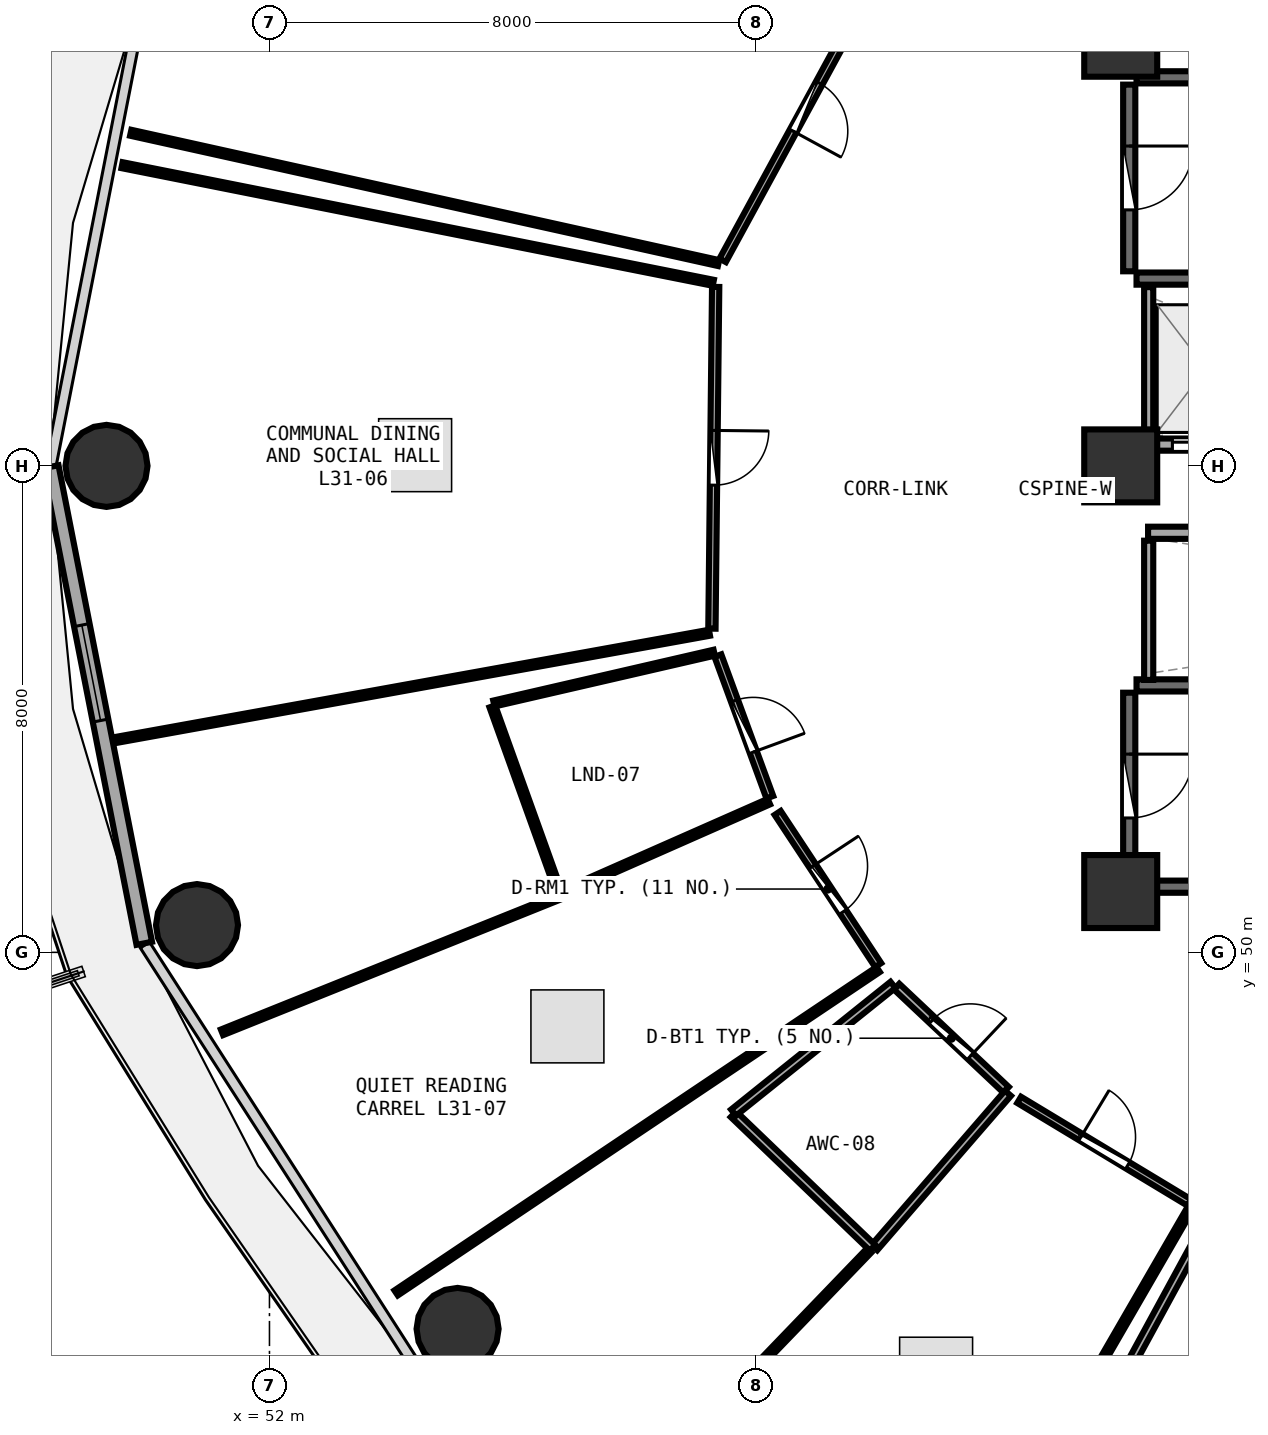
"""IFC4 building model, lengths in metres.
Left out: names, types, materials, properties, quantities, classifications, styles, units other than length and angle.
Written with IfcOpenShell. Run it as: python <this file> out.ifc"""

import sys

from ifc_helpers import new_model, si_unit, direction, frame, frame_2d, origin, origin_2d, place, context, subcontext, project, spatial, rectangle, circle, extrude, element, fill, save


model = new_model("IFC4")
c1 = context("Model", 3, precision=1e-05, world=origin(), true_north=direction((0.0, 1.0)))
c2 = subcontext(c1, "Body", "Model", "MODEL_VIEW")
j1 = project(units=[si_unit("LENGTHUNIT", "METRE"), si_unit("PLANEANGLEUNIT", "RADIAN")], contexts=[c1])
p1 = place(None, origin())
s1 = spatial("IfcSite", under=j1, at=p1, CompositionType="ELEMENT")
p2 = place(p1, origin())
s2 = spatial("IfcBuilding", under=s1, at=p2, CompositionType="ELEMENT")
p3 = place(p2, frame((0.0, 0.0, 121.35)))
s3 = spatial("IfcBuildingStorey", under=s2, at=p3, CompositionType="ELEMENT", Elevation=121.35)
for number, where, z_axis, x_axis in (
    (1, (66.0, 51.0, 0.0), (0.0, 0.0, 1.0), (1.0, 0.0, 0.0)),
    (2, (66.0, 65.0, 0.0), (0.0, 0.0, 1.0), (1.0, 0.0, 0.0)),
    (3, (66.0, 58.0, 0.0), (0.0, 0.0, 1.0), (1.0, 0.0, 0.0)),
):
    element("IfcColumn", number, at=place(p3, frame(where, z_axis=z_axis, x_axis=x_axis)), inside=s3, PredefinedType="PILASTER", context=c2, shape_type="SweptSolid", body=[
        extrude(rectangle(XDim=1.2, YDim=1.2, at=origin_2d()), origin(), (0.0, 0.0, 1.0), 3.75),
    ])
for number, where, z_axis, x_axis in (
    (4, (49.32, 58.0, 0.0), (0.0, 0.0, 1.0), (1.0, 0.0, 0.0)),
    (5, (50.808, 50.448, 0.0), (0.0, 0.0, 1.0), (1.0, 0.0, 0.0)),
    (6, (55.094, 43.807, 0.0), (0.0, 0.0, 1.0), (1.0, 0.0, 0.0)),
):
    element("IfcColumn", number, at=place(p3, frame(where, z_axis=z_axis, x_axis=x_axis)), inside=s3, PredefinedType="COLUMN", context=c2, shape_type="SweptSolid", body=[
        extrude(circle(Radius=0.675, at=origin_2d()), origin(), (0.0, 0.0, 1.0), 3.75),
    ])
p4 = place(p3, frame((48.403, 57.985, 0.0), z_axis=(0.0, 0.0, 1.0), x_axis=(0.192581843632, -0.981280914674, 0.0)))
e7 = element("IfcWall", 7, at=p4, inside=s3, PredefinedType="SOLIDWALL", context=c2, shape_type="SweptSolid", body=[
    extrude(rectangle(XDim=7.987, YDim=0.26, at=frame_2d((3.993, 0.0))), origin(), (0.0, 0.0, 1.0), 3.475),
])
p5 = place(p4, frame((2.653, 0.0, 0.85)))
e8 = element("IfcOpeningElement", 8, at=p5, cuts=e7, PredefinedType="OPENING", context=c2, shape_type="SweptSolid", body=[
    extrude(rectangle(XDim=1.6, YDim=1.45, at=frame_2d((0.8, 0.725))), frame((0.0, 0.14, 0.0), z_axis=(0.0, -1.0, 0.0), x_axis=(1.0, 0.0, 0.0)), (0.0, 0.0, 1.0), 0.28),
])
for number, where, z_axis, x_axis in (
    (9, (66.26, 61.08, 0.0), (0.0, 0.0, 1.0), (1.0, 0.0, 0.0)),
    (10, (73.42, 64.39, 0.0), (0.0, 0.0, 1.0), (-1.0, 0.0, 0.0)),
):
    element("IfcWall", number, at=place(p3, frame(where, z_axis=z_axis, x_axis=x_axis)), inside=s3, PredefinedType="SHEAR", context=c2, shape_type="SweptSolid", body=[
        extrude(rectangle(XDim=7.16, YDim=0.2, at=frame_2d((3.58, 0.0))), origin(), (0.0, 0.0, 1.0), 3.49),
    ])
p6 = place(p3, frame((66.14, 64.27, 0.0), z_axis=(0.0, 0.0, 1.0), x_axis=(0.0, -1.0, 0.0)))
e11 = element("IfcWall", 11, at=p6, inside=s3, PredefinedType="SHEAR", context=c2, shape_type="SweptSolid", body=[
    extrude(rectangle(XDim=3.07, YDim=0.2, at=frame_2d((1.535, 0.0))), origin(), (0.0, 0.0, 1.0), 3.49),
])
p7 = place(p6, frame((1.01, 0.0, 0.0)))
e12 = element("IfcOpeningElement", 12, at=p7, cuts=e11, PredefinedType="OPENING", context=c2, shape_type="SweptSolid", body=[
    extrude(rectangle(XDim=1.05, YDim=2.1, at=frame_2d((0.525, 1.05))), frame((0.0, 0.11, 0.0), z_axis=(0.0, -1.0, 0.0), x_axis=(1.0, 0.0, 0.0)), (0.0, 0.0, 1.0), 0.22),
])
for number, where, z_axis, x_axis in (
    (13, (66.26, 51.08, 0.0), (0.0, 0.0, 1.0), (1.0, 0.0, 0.0)),
    (14, (73.42, 54.39, 0.0), (0.0, 0.0, 1.0), (-1.0, 0.0, 0.0)),
):
    element("IfcWall", number, at=place(p3, frame(where, z_axis=z_axis, x_axis=x_axis)), inside=s3, PredefinedType="SHEAR", context=c2, shape_type="SweptSolid", body=[
        extrude(rectangle(XDim=7.16, YDim=0.2, at=frame_2d((3.58, 0.0))), origin(), (0.0, 0.0, 1.0), 3.49),
    ])
p8 = place(p3, frame((66.14, 54.27, 0.0), z_axis=(0.0, 0.0, 1.0), x_axis=(0.0, -1.0, 0.0)))
e15 = element("IfcWall", 15, at=p8, inside=s3, PredefinedType="SHEAR", context=c2, shape_type="SweptSolid", body=[
    extrude(rectangle(XDim=3.07, YDim=0.2, at=frame_2d((1.535, 0.0))), origin(), (0.0, 0.0, 1.0), 3.49),
])
p9 = place(p8, frame((1.01, 0.0, 0.0)))
e16 = element("IfcOpeningElement", 16, at=p9, cuts=e15, PredefinedType="OPENING", context=c2, shape_type="SweptSolid", body=[
    extrude(rectangle(XDim=1.05, YDim=2.1, at=frame_2d((0.525, 1.05))), frame((0.0, 0.11, 0.0), z_axis=(0.0, -1.0, 0.0), x_axis=(1.0, 0.0, 0.0)), (0.0, 0.0, 1.0), 0.22),
])
p10 = place(p3, frame((66.45, 58.35, 0.0), z_axis=(0.0, 0.0, 1.0), x_axis=(1.0, 0.0, 0.0)))
e17 = element("IfcWall", 17, at=p10, inside=s3, PredefinedType="SOLIDWALL", context=c2, shape_type="SweptSolid", body=[
    extrude(rectangle(XDim=6.0, YDim=0.2, at=frame_2d((3.0, 0.0))), origin(), (0.0, 0.0, 1.0), 3.48),
])
p11 = place(p10, frame((0.4, 0.0, 0.0)))
e18 = element("IfcOpeningElement", 18, at=p11, cuts=e17, PredefinedType="OPENING", context=c2, shape_type="SweptSolid", body=[
    extrude(rectangle(XDim=1.1, YDim=2.1, at=frame_2d((0.55, 1.05))), frame((0.0, 0.11, 0.0), z_axis=(0.0, -1.0, 0.0), x_axis=(1.0, 0.0, 0.0)), (0.0, 0.0, 1.0), 0.22),
])
p12 = place(p10, frame((2.4, 0.0, 0.0)))
e19 = element("IfcOpeningElement", 19, at=p12, cuts=e17, PredefinedType="OPENING", context=c2, shape_type="SweptSolid", body=[
    extrude(rectangle(XDim=1.1, YDim=2.1, at=frame_2d((0.55, 1.05))), frame((0.0, 0.11, 0.0), z_axis=(0.0, -1.0, 0.0), x_axis=(1.0, 0.0, 0.0)), (0.0, 0.0, 1.0), 0.22),
])
p13 = place(p10, frame((4.4, 0.0, 0.0)))
e20 = element("IfcOpeningElement", 20, at=p13, cuts=e17, PredefinedType="OPENING", context=c2, shape_type="SweptSolid", body=[
    extrude(rectangle(XDim=1.1, YDim=2.1, at=frame_2d((0.55, 1.05))), frame((0.0, 0.11, 0.0), z_axis=(0.0, -1.0, 0.0), x_axis=(1.0, 0.0, 0.0)), (0.0, 0.0, 1.0), 0.22),
])
p14 = place(p3, frame((66.46, 58.48, 0.0), z_axis=(0.0, 0.0, 1.0), x_axis=(0.0, 1.0, 0.0)))
e21 = element("IfcWall", 21, at=p14, inside=s3, PredefinedType="PARTITIONING", context=c2, shape_type="SweptSolid", body=[
    extrude(rectangle(XDim=2.46, YDim=0.15, at=frame_2d((1.23, 0.0))), origin(), (0.0, 0.0, 1.0), 3.48),
])
p15 = place(p3, frame((66.45, 56.9, 0.0), z_axis=(0.0, 0.0, 1.0), x_axis=(1.0, 0.0, 0.0)))
e22 = element("IfcWall", 22, at=p15, inside=s3, PredefinedType="SOLIDWALL", context=c2, shape_type="SweptSolid", body=[
    extrude(rectangle(XDim=14.4, YDim=0.2, at=frame_2d((7.2, 0.0))), origin(), (0.0, 0.0, 1.0), 3.48),
])
p16 = place(p3, frame((66.46, 54.48, 0.0), z_axis=(0.0, 0.0, 1.0), x_axis=(0.0, 1.0, 0.0)))
e23 = element("IfcWall", 23, at=p16, inside=s3, PredefinedType="PARTITIONING", context=c2, shape_type="SweptSolid", body=[
    extrude(rectangle(XDim=2.29, YDim=0.15, at=frame_2d((1.145, 0.0))), origin(), (0.0, 0.0, 1.0), 3.48),
])
p17 = place(p3, frame((62.199, 66.421, 0.0), z_axis=(0.0, 0.0, 1.0), x_axis=(-0.478256103777, -0.878220416069, 0.0)))
e24 = element("IfcWall", 24, at=p17, inside=s3, PredefinedType="PARTITIONING", context=c2, shape_type="SweptSolid", body=[
    extrude(rectangle(XDim=5.741, YDim=0.12, at=frame_2d((2.871, 0.0))), origin(), (0.0, 0.0, 1.0), 2.925),
])
p18 = place(p17, frame((2.42, 0.0, 0.0)))
e25 = element("IfcOpeningElement", 25, at=p18, cuts=e24, PredefinedType="OPENING", context=c2, shape_type="SweptSolid", body=[
    extrude(rectangle(XDim=0.9, YDim=2.08, at=frame_2d((0.45, 1.04))), frame((0.0, 0.07, 0.0), z_axis=(0.0, -1.0, 0.0), x_axis=(1.0, 0.0, 0.0)), (0.0, 0.0, 1.0), 0.14),
])
p19 = place(p3, frame((59.338, 60.943, 0.0), z_axis=(0.0, 0.0, 1.0), x_axis=(-0.010989779386, -0.999939610551, 0.0)))
e26 = element("IfcWall", 26, at=p19, inside=s3, PredefinedType="PARTITIONING", context=c2, shape_type="SweptSolid", body=[
    extrude(rectangle(XDim=5.62, YDim=0.12, at=frame_2d((2.81, 0.0))), origin(), (0.0, 0.0, 1.0), 2.925),
])
p20 = place(p19, frame((2.36, 0.0, 0.0)))
e27 = element("IfcOpeningElement", 27, at=p20, cuts=e26, PredefinedType="OPENING", context=c2, shape_type="SweptSolid", body=[
    extrude(rectangle(XDim=0.9, YDim=2.08, at=frame_2d((0.45, 1.04))), frame((0.0, 0.07, 0.0), z_axis=(0.0, -1.0, 0.0), x_axis=(1.0, 0.0, 0.0)), (0.0, 0.0, 1.0), 0.14),
])
p21 = place(p3, frame((59.375, 54.881, 0.0), z_axis=(0.0, 0.0, 1.0), x_axis=(0.344396316594, -0.938824359035, 0.0)))
e28 = element("IfcWall", 28, at=p21, inside=s3, PredefinedType="PARTITIONING", context=c2, shape_type="SweptSolid", body=[
    extrude(rectangle(XDim=2.481, YDim=0.12, at=frame_2d((1.241, 0.0))), origin(), (0.0, 0.0, 1.0), 3.235),
])
p22 = place(p21, frame((0.791, 0.0, 0.0)))
e29 = element("IfcOpeningElement", 29, at=p22, cuts=e28, PredefinedType="OPENING", context=c2, shape_type="SweptSolid", body=[
    extrude(rectangle(XDim=0.9, YDim=2.08, at=frame_2d((0.45, 1.04))), frame((0.0, 0.07, 0.0), z_axis=(0.0, -1.0, 0.0), x_axis=(1.0, 0.0, 0.0)), (0.0, 0.0, 1.0), 0.14),
])
p23 = place(p3, frame((60.358, 52.293, 0.0), z_axis=(0.0, 0.0, 1.0), x_axis=(0.551050840628, -0.834471671804, 0.0)))
e30 = element("IfcWall", 30, at=p23, inside=s3, PredefinedType="PARTITIONING", context=c2, shape_type="SweptSolid", body=[
    extrude(rectangle(XDim=3.0, YDim=0.12, at=frame_2d((1.5, 0.0))), origin(), (0.0, 0.0, 1.0), 2.925),
])
p24 = place(p23, frame((1.05, 0.0, 0.0)))
e31 = element("IfcOpeningElement", 31, at=p24, cuts=e30, PredefinedType="OPENING", context=c2, shape_type="SweptSolid", body=[
    extrude(rectangle(XDim=0.9, YDim=2.08, at=frame_2d((0.45, 1.04))), frame((0.0, 0.07, 0.0), z_axis=(0.0, -1.0, 0.0), x_axis=(1.0, 0.0, 0.0)), (0.0, 0.0, 1.0), 0.14),
])
p25 = place(p3, frame((62.314, 49.437, 0.0), z_axis=(0.0, 0.0, 1.0), x_axis=(0.727704720547, -0.68589054498, 0.0)))
e32 = element("IfcWall", 32, at=p25, inside=s3, PredefinedType="PLUMBINGWALL", context=c2, shape_type="SweptSolid", body=[
    extrude(rectangle(XDim=2.476, YDim=0.13, at=frame_2d((1.238, 0.0))), origin(), (0.0, 0.0, 1.0), 2.925),
])
p26 = place(p25, frame((0.808, 0.0, 0.0)))
e33 = element("IfcOpeningElement", 33, at=p26, cuts=e32, PredefinedType="OPENING", context=c2, shape_type="SweptSolid", body=[
    extrude(rectangle(XDim=0.86, YDim=2.05, at=frame_2d((0.43, 1.025))), frame((0.0, 0.075, 0.0), z_axis=(0.0, -1.0, 0.0), x_axis=(1.0, 0.0, 0.0)), (0.0, 0.0, 1.0), 0.15),
])
p27 = place(p3, frame((64.329, 47.574, 0.0), z_axis=(0.0, 0.0, 1.0), x_axis=(0.8562252486, -0.516602674848, 0.0)))
e34 = element("IfcWall", 34, at=p27, inside=s3, PredefinedType="PARTITIONING", context=c2, shape_type="SweptSolid", body=[
    extrude(rectangle(XDim=3.269, YDim=0.12, at=frame_2d((1.635, 0.0))), origin(), (0.0, 0.0, 1.0), 2.925),
])
p28 = place(p27, frame((1.185, 0.0, 0.0)))
e35 = element("IfcOpeningElement", 35, at=p28, cuts=e34, PredefinedType="OPENING", context=c2, shape_type="SweptSolid", body=[
    extrude(rectangle(XDim=0.9, YDim=2.08, at=frame_2d((0.45, 1.04))), frame((0.0, 0.07, 0.0), z_axis=(0.0, -1.0, 0.0), x_axis=(1.0, 0.0, 0.0)), (0.0, 0.0, 1.0), 0.14),
])
p29 = place(p3, frame((59.386, 61.336, 0.0), z_axis=(0.0, 0.0, 1.0), x_axis=(-0.976312199438, 0.216366562178, 0.0)))
e36 = element("IfcWall", 36, at=p29, inside=s3, PredefinedType="PARTITIONING", context=c2, shape_type="SweptSolid", body=[
    extrude(rectangle(XDim=9.903, YDim=0.1, at=frame_2d((4.951, 0.0))), origin(), (0.0, 0.0, 1.0), 2.975),
])
p30 = place(p3, frame((59.237, 55.256, 0.0), z_axis=(0.0, 0.0, 1.0), x_axis=(-0.984081766615, -0.177716281237, 0.0)))
e37 = element("IfcWall", 37, at=p30, inside=s3, PredefinedType="PARTITIONING", context=c2, shape_type="SweptSolid", body=[
    extrude(rectangle(XDim=9.924, YDim=0.1, at=frame_2d((4.962, 0.0))), origin(), (0.0, 0.0, 1.0), 2.975),
])
p31 = place(p3, frame((49.575, 62.945, 0.0), z_axis=(0.0, 0.0, 1.0), x_axis=(0.980780933509, -0.195112174059, 0.0)))
e38 = element("IfcWall", 38, at=p31, inside=s3, PredefinedType="PARTITIONING", context=c2, shape_type="SweptSolid", body=[
    extrude(rectangle(XDim=9.915, YDim=0.1, at=frame_2d((4.958, 0.0))), origin(), (0.0, 0.0, 1.0), 2.975),
])
p32 = place(p3, frame((60.213, 52.479, 0.0), z_axis=(0.0, 0.0, 1.0), x_axis=(-0.914847920866, -0.403798565732, 0.0)))
e39 = element("IfcWall", 39, at=p32, inside=s3, PredefinedType="PARTITIONING", context=c2, shape_type="SweptSolid", body=[
    extrude(rectangle(XDim=3.719, YDim=0.1, at=frame_2d((1.86, 0.0))), origin(), (0.0, 0.0, 1.0), 3.175),
])
p33 = place(p3, frame((56.76, 50.999, 0.0), z_axis=(0.0, 0.0, 1.0), x_axis=(-0.338198726163, 0.94107471628, 0.0)))
e40 = element("IfcWall", 40, at=p33, inside=s3, PredefinedType="PARTITIONING", context=c2, shape_type="SweptSolid", body=[
    extrude(rectangle(XDim=3.238, YDim=0.1, at=frame_2d((1.619, 0.0))), origin(), (0.0, 0.0, 1.0), 3.175),
])
p34 = place(p3, frame((55.691, 54.092, 0.0), z_axis=(0.0, 0.0, 1.0), x_axis=(0.974413318027, 0.224763621728, 0.0)))
e41 = element("IfcWall", 41, at=p34, inside=s3, PredefinedType="PARTITIONING", context=c2, shape_type="SweptSolid", body=[
    extrude(rectangle(XDim=3.719, YDim=0.1, at=frame_2d((1.86, 0.0))), origin(), (0.0, 0.0, 1.0), 3.175),
])
p35 = place(p3, frame((62.011, 49.718, 0.0), z_axis=(0.0, 0.0, 1.0), x_axis=(-0.830433607217, -0.557117603388, 0.0)))
e42 = element("IfcWall", 42, at=p35, inside=s3, PredefinedType="PARTITIONING", context=c2, shape_type="SweptSolid", body=[
    extrude(rectangle(XDim=9.546, YDim=0.1, at=frame_2d((4.773, 0.0))), origin(), (0.0, 0.0, 1.0), 2.975),
])
p36 = place(p3, frame((51.219, 48.685, 0.0), z_axis=(0.0, 0.0, 1.0), x_axis=(0.927926926295, 0.372762148637, 0.0)))
e43 = element("IfcWall", 43, at=p36, inside=s3, PredefinedType="PARTITIONING", context=c2, shape_type="SweptSolid", body=[
    extrude(rectangle(XDim=6.044, YDim=0.1, at=frame_2d((3.022, 0.0))), origin(), (0.0, 0.0, 1.0), 2.925),
])
p37 = place(p3, frame((64.146, 47.683, 0.0), z_axis=(0.0, 0.0, 1.0), x_axis=(-0.654725816563, -0.75586645985, 0.0)))
e44 = element("IfcWall", 44, at=p37, inside=s3, PredefinedType="PLUMBINGWALL", context=c2, shape_type="SweptSolid", body=[
    extrude(rectangle(XDim=3.36, YDim=0.13, at=frame_2d((1.68, 0.0))), origin(), (0.0, 0.0, 1.0), 3.235),
])
p38 = place(p3, frame((61.919, 45.142, 0.0), z_axis=(0.0, 0.0, 1.0), x_axis=(-0.721319622767, 0.692602340316, 0.0)))
e45 = element("IfcWall", 45, at=p38, inside=s3, PredefinedType="PLUMBINGWALL", context=c2, shape_type="SweptSolid", body=[
    extrude(rectangle(XDim=3.171, YDim=0.13, at=frame_2d((1.585, 0.0))), origin(), (0.0, 0.0, 1.0), 2.925),
])
p39 = place(p3, frame((59.633, 47.365, 0.0), z_axis=(0.0, 0.0, 1.0), x_axis=(0.780343931947, 0.625350579974, 0.0)))
e46 = element("IfcWall", 46, at=p39, inside=s3, PredefinedType="PLUMBINGWALL", context=c2, shape_type="SweptSolid", body=[
    extrude(rectangle(XDim=3.36, YDim=0.13, at=frame_2d((1.68, 0.0))), origin(), (0.0, 0.0, 1.0), 3.235),
])
p40 = place(p3, frame((67.16, 45.819, 0.0), z_axis=(0.0, 0.0, 1.0), x_axis=(-0.500668535271, -0.865639080558, 0.0)))
e47 = element("IfcWall", 47, at=p40, inside=s3, PredefinedType="PARTITIONING", context=c2, shape_type="SweptSolid", body=[
    extrude(rectangle(XDim=9.03, YDim=0.1, at=frame_2d((4.515, 0.0))), origin(), (0.0, 0.0, 1.0), 2.925),
])
p41 = place(p3, frame((57.806, 40.885, 0.0), z_axis=(0.0, 0.0, 1.0), x_axis=(0.693697879067, 0.720266098451, 0.0)))
e48 = element("IfcWall", 48, at=p41, inside=s3, PredefinedType="PARTITIONING", context=c2, shape_type="SweptSolid", body=[
    extrude(rectangle(XDim=5.844, YDim=0.1, at=frame_2d((2.922, 0.0))), origin(), (0.0, 0.0, 1.0), 2.975),
])
p42 = place(p3, frame((65.54, 42.089, 0.0), z_axis=(0.0, 0.0, 1.0), x_axis=(0.478075883312, 0.878318535496, 0.0)))
e49 = element("IfcWall", 49, at=p42, inside=s3, PredefinedType="PLUMBINGWALL", context=c2, shape_type="SweptSolid", body=[
    extrude(rectangle(XDim=4.1, YDim=0.13, at=frame_2d((2.05, 0.0))), origin(), (0.0, 0.0, 1.0), 2.925),
])
p43 = place(p5, origin())
e50 = element("IfcWindow", 50, at=p43, inside=s3, PartitioningType="SINGLE_PANEL", PredefinedType="WINDOW", context=c2, shape_type="SweptSolid", body=[
    extrude(rectangle(XDim=1.6, YDim=1.45, at=frame_2d((0.8, 0.725))), frame((0.0, 0.03, 0.0), z_axis=(0.0, -1.0, 0.0), x_axis=(1.0, 0.0, 0.0)), (0.0, 0.0, 1.0), 0.06),
])
fill(e8, e50)
p44 = place(p7, origin())
e51 = element("IfcDoor", 51, at=p44, inside=s3, OperationType="SINGLE_SWING_LEFT", PredefinedType="DOOR", context=c2, shape_type="SweptSolid", body=[
    extrude(rectangle(XDim=1.05, YDim=2.1, at=frame_2d((0.525, 1.05))), frame((0.0, 0.025, 0.0), z_axis=(0.0, -1.0, 0.0), x_axis=(1.0, 0.0, 0.0)), (0.0, 0.0, 1.0), 0.05),
])
fill(e12, e51)
p45 = place(p9, origin())
e52 = element("IfcDoor", 52, at=p45, inside=s3, OperationType="SINGLE_SWING_LEFT", PredefinedType="DOOR", context=c2, shape_type="SweptSolid", body=[
    extrude(rectangle(XDim=1.05, YDim=2.1, at=frame_2d((0.525, 1.05))), frame((0.0, 0.025, 0.0), z_axis=(0.0, -1.0, 0.0), x_axis=(1.0, 0.0, 0.0)), (0.0, 0.0, 1.0), 0.05),
])
fill(e16, e52)
p46 = place(p11, origin())
e53 = element("IfcDoor", 53, at=p46, inside=s3, OperationType="DOUBLE_DOOR_SLIDING", PredefinedType="DOOR", context=c2, shape_type="SweptSolid", body=[
    extrude(rectangle(XDim=1.1, YDim=2.1, at=frame_2d((0.55, 1.05))), frame((0.0, 0.025, 0.0), z_axis=(0.0, -1.0, 0.0), x_axis=(1.0, 0.0, 0.0)), (0.0, 0.0, 1.0), 0.05),
])
fill(e18, e53)
p47 = place(p18, origin())
e54 = element("IfcDoor", 54, at=p47, inside=s3, OperationType="SINGLE_SWING_RIGHT", PredefinedType="DOOR", context=c2, shape_type="SweptSolid", body=[
    extrude(rectangle(XDim=0.9, YDim=2.08, at=frame_2d((0.45, 1.04))), frame((0.0, 0.025, 0.0), z_axis=(0.0, -1.0, 0.0), x_axis=(1.0, 0.0, 0.0)), (0.0, 0.0, 1.0), 0.05),
])
fill(e25, e54)
p48 = place(p20, origin())
e55 = element("IfcDoor", 55, at=p48, inside=s3, OperationType="SINGLE_SWING_LEFT", PredefinedType="DOOR", context=c2, shape_type="SweptSolid", body=[
    extrude(rectangle(XDim=0.9, YDim=2.08, at=frame_2d((0.45, 1.04))), frame((0.0, 0.025, 0.0), z_axis=(0.0, -1.0, 0.0), x_axis=(1.0, 0.0, 0.0)), (0.0, 0.0, 1.0), 0.05),
])
fill(e27, e55)
p49 = place(p22, origin())
e56 = element("IfcDoor", 56, at=p49, inside=s3, OperationType="SINGLE_SWING_RIGHT", PredefinedType="DOOR", context=c2, shape_type="SweptSolid", body=[
    extrude(rectangle(XDim=0.9, YDim=2.08, at=frame_2d((0.45, 1.04))), frame((0.0, 0.025, 0.0), z_axis=(0.0, -1.0, 0.0), x_axis=(1.0, 0.0, 0.0)), (0.0, 0.0, 1.0), 0.05),
])
fill(e29, e56)
p50 = place(p24, origin())
e57 = element("IfcDoor", 57, at=p50, inside=s3, OperationType="SINGLE_SWING_LEFT", PredefinedType="DOOR", context=c2, shape_type="SweptSolid", body=[
    extrude(rectangle(XDim=0.9, YDim=2.08, at=frame_2d((0.45, 1.04))), frame((0.0, 0.025, 0.0), z_axis=(0.0, -1.0, 0.0), x_axis=(1.0, 0.0, 0.0)), (0.0, 0.0, 1.0), 0.05),
])
fill(e31, e57)
p51 = place(p26, origin())
e58 = element("IfcDoor", 58, at=p51, inside=s3, OperationType="SINGLE_SWING_RIGHT", PredefinedType="DOOR", context=c2, shape_type="SweptSolid", body=[
    extrude(rectangle(XDim=0.86, YDim=2.05, at=frame_2d((0.43, 1.025))), frame((0.0, 0.025, 0.0), z_axis=(0.0, -1.0, 0.0), x_axis=(1.0, 0.0, 0.0)), (0.0, 0.0, 1.0), 0.05),
])
fill(e33, e58)
p52 = place(p28, origin())
e59 = element("IfcDoor", 59, at=p52, inside=s3, OperationType="SINGLE_SWING_LEFT", PredefinedType="DOOR", context=c2, shape_type="SweptSolid", body=[
    extrude(rectangle(XDim=0.9, YDim=2.08, at=frame_2d((0.45, 1.04))), frame((0.0, 0.025, 0.0), z_axis=(0.0, -1.0, 0.0), x_axis=(1.0, 0.0, 0.0)), (0.0, 0.0, 1.0), 0.05),
])
fill(e35, e59)
save(model, sys.argv[1])
